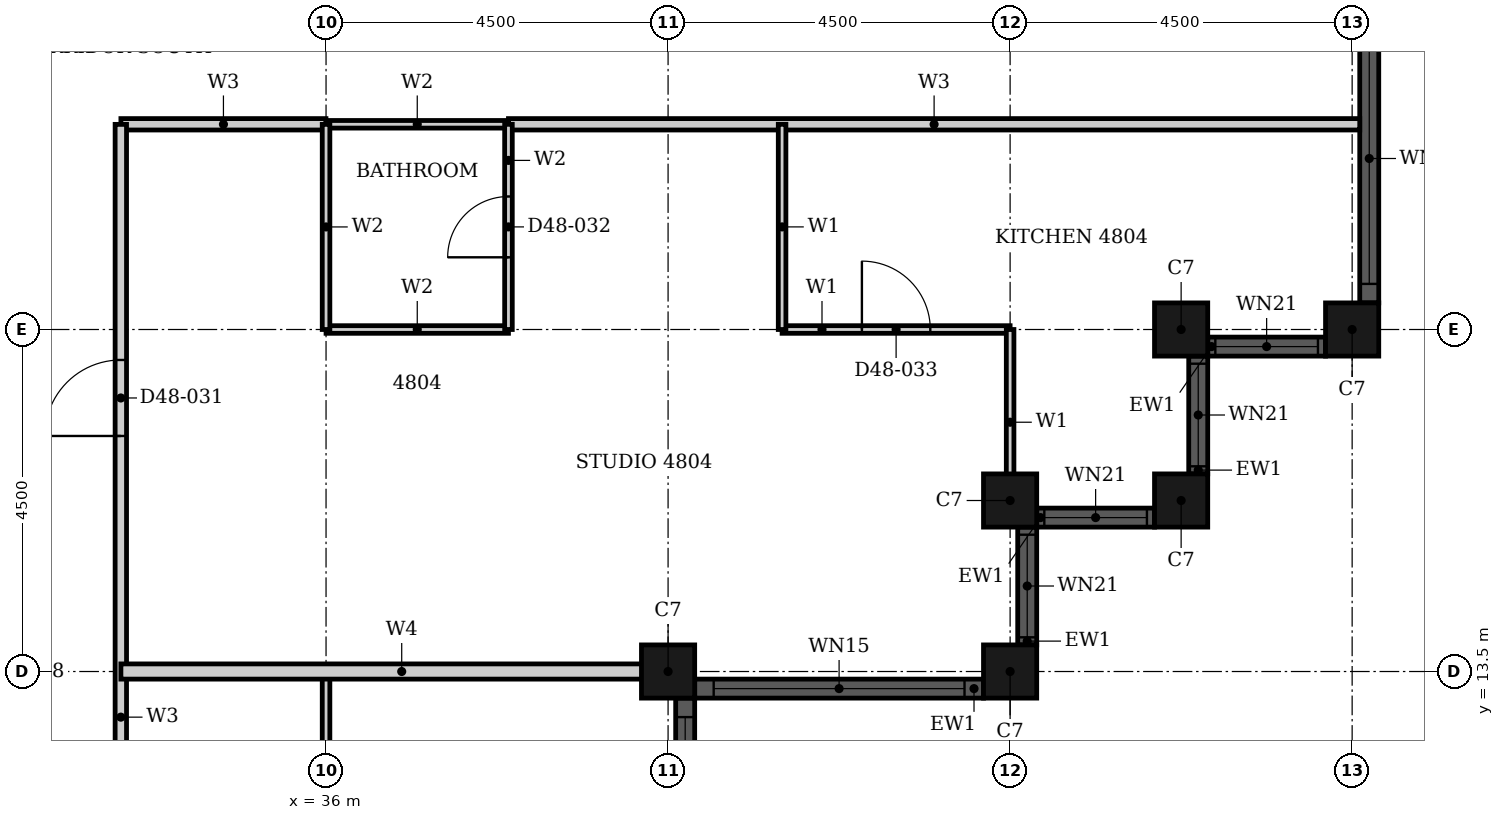
"""IFC4 building model, lengths in metres.
Left out: names, types, materials, properties, quantities, classifications, styles, units other than length and angle.
Written with IfcOpenShell. Run it as: python <this file> out.ifc"""

import sys

from ifc_helpers import new_model, si_unit, direction, frame, frame_2d, origin, origin_2d, place, context, subcontext, project, spatial, rectangle, hollow_rectangle, extrude, element, fill, save


model = new_model("IFC4")
c1 = context("Model", 3, precision=1e-05, world=origin(), true_north=direction((0.0, 1.0)))
c2 = subcontext(c1, "Body", "Model", "MODEL_VIEW")
j1 = project(units=[si_unit("LENGTHUNIT", "METRE"), si_unit("PLANEANGLEUNIT", "RADIAN")], contexts=[c1])
p1 = place(None, origin())
s1 = spatial("IfcSite", under=j1, at=p1, CompositionType="ELEMENT")
p2 = place(p1, origin())
s2 = spatial("IfcBuilding", under=s1, at=p2, CompositionType="ELEMENT")
p3 = place(p2, frame((0.0, 0.0, 192.4)))
s3 = spatial("IfcBuildingStorey", under=s2, at=p3, CompositionType="ELEMENT", Elevation=192.4)
for number, where, z_axis, x_axis in (
    (1, (40.5, 13.5, 0.0), (0.0, 0.0, 1.0), (1.0, 0.0, 0.0)),
    (2, (45.0, 13.5, 0.0), (0.0, 0.0, 1.0), (1.0, 0.0, 0.0)),
    (3, (45.0, 15.75, 0.0), (0.0, 0.0, 1.0), (1.0, 0.0, 0.0)),
    (4, (47.25, 15.75, 0.0), (0.0, 0.0, 1.0), (1.0, 0.0, 0.0)),
    (5, (47.25, 18.0, 0.0), (0.0, 0.0, 1.0), (1.0, 0.0, 0.0)),
    (6, (49.5, 18.0, 0.0), (0.0, 0.0, 1.0), (1.0, 0.0, 0.0)),
):
    element("IfcColumn", number, at=place(p3, frame(where, z_axis=z_axis, x_axis=x_axis)), inside=s3, PredefinedType="COLUMN", context=c2, shape_type="SweptSolid", body=[
        extrude(hollow_rectangle(XDim=0.7, YDim=0.7, WallThickness=0.022, at=origin_2d()), origin(), (0.0, 0.0, 1.0), 3.7),
    ])
p4 = place(p3, frame((40.85, 13.275, 0.0), z_axis=(0.0, 0.0, 1.0), x_axis=(1.0, 0.0, 0.0)))
e7 = element("IfcWall", 7, at=p4, inside=s3, PredefinedType="SOLIDWALL", context=c2, shape_type="SweptSolid", body=[
    extrude(rectangle(XDim=3.8, YDim=0.25, at=frame_2d((1.9, 0.0))), origin(), (0.0, 0.0, 1.0), 3.7),
])
p5 = place(p4, frame((0.25, 0.0, 0.45)))
e8 = element("IfcOpeningElement", 8, at=p5, cuts=e7, PredefinedType="OPENING", context=c2, shape_type="SweptSolid", body=[
    extrude(rectangle(XDim=3.3, YDim=2.3, at=frame_2d((1.65, 1.15))), frame((0.0, 0.135, 0.0), z_axis=(0.0, -1.0, 0.0), x_axis=(1.0, 0.0, 0.0)), (0.0, 0.0, 1.0), 0.27),
])
p6 = place(p3, frame((45.225, 13.85, 0.0), z_axis=(0.0, 0.0, 1.0), x_axis=(0.0, 1.0, 0.0)))
e9 = element("IfcWall", 9, at=p6, inside=s3, PredefinedType="SOLIDWALL", context=c2, shape_type="SweptSolid", body=[
    extrude(rectangle(XDim=1.55, YDim=0.25, at=frame_2d((0.775, 0.0))), origin(), (0.0, 0.0, 1.0), 3.7),
])
p7 = place(p6, frame((0.1, 0.0, 0.9)))
e10 = element("IfcOpeningElement", 10, at=p7, cuts=e9, PredefinedType="OPENING", context=c2, shape_type="SweptSolid", body=[
    extrude(rectangle(XDim=1.35, YDim=1.85, at=frame_2d((0.675, 0.925))), frame((0.0, 0.135, 0.0), z_axis=(0.0, -1.0, 0.0), x_axis=(1.0, 0.0, 0.0)), (0.0, 0.0, 1.0), 0.27),
])
p8 = place(p3, frame((45.35, 15.525, 0.0), z_axis=(0.0, 0.0, 1.0), x_axis=(1.0, 0.0, 0.0)))
e11 = element("IfcWall", 11, at=p8, inside=s3, PredefinedType="SOLIDWALL", context=c2, shape_type="SweptSolid", body=[
    extrude(rectangle(XDim=1.55, YDim=0.25, at=frame_2d((0.775, 0.0))), origin(), (0.0, 0.0, 1.0), 3.7),
])
p9 = place(p8, frame((0.1, 0.0, 0.9)))
e12 = element("IfcOpeningElement", 12, at=p9, cuts=e11, PredefinedType="OPENING", context=c2, shape_type="SweptSolid", body=[
    extrude(rectangle(XDim=1.35, YDim=1.85, at=frame_2d((0.675, 0.925))), frame((0.0, 0.135, 0.0), z_axis=(0.0, -1.0, 0.0), x_axis=(1.0, 0.0, 0.0)), (0.0, 0.0, 1.0), 0.27),
])
p10 = place(p3, frame((47.475, 16.1, 0.0), z_axis=(0.0, 0.0, 1.0), x_axis=(0.0, 1.0, 0.0)))
e13 = element("IfcWall", 13, at=p10, inside=s3, PredefinedType="SOLIDWALL", context=c2, shape_type="SweptSolid", body=[
    extrude(rectangle(XDim=1.55, YDim=0.25, at=frame_2d((0.775, 0.0))), origin(), (0.0, 0.0, 1.0), 3.7),
])
p11 = place(p10, frame((0.1, 0.0, 0.9)))
e14 = element("IfcOpeningElement", 14, at=p11, cuts=e13, PredefinedType="OPENING", context=c2, shape_type="SweptSolid", body=[
    extrude(rectangle(XDim=1.35, YDim=1.85, at=frame_2d((0.675, 0.925))), frame((0.0, 0.135, 0.0), z_axis=(0.0, -1.0, 0.0), x_axis=(1.0, 0.0, 0.0)), (0.0, 0.0, 1.0), 0.27),
])
p12 = place(p3, frame((47.6, 17.775, 0.0), z_axis=(0.0, 0.0, 1.0), x_axis=(1.0, 0.0, 0.0)))
e15 = element("IfcWall", 15, at=p12, inside=s3, PredefinedType="SOLIDWALL", context=c2, shape_type="SweptSolid", body=[
    extrude(rectangle(XDim=1.55, YDim=0.25, at=frame_2d((0.775, 0.0))), origin(), (0.0, 0.0, 1.0), 3.7),
])
p13 = place(p12, frame((0.1, 0.0, 0.9)))
e16 = element("IfcOpeningElement", 16, at=p13, cuts=e15, PredefinedType="OPENING", context=c2, shape_type="SweptSolid", body=[
    extrude(rectangle(XDim=1.35, YDim=1.85, at=frame_2d((0.675, 0.925))), frame((0.0, 0.135, 0.0), z_axis=(0.0, -1.0, 0.0), x_axis=(1.0, 0.0, 0.0)), (0.0, 0.0, 1.0), 0.27),
])
p14 = place(p3, frame((49.725, 18.35, 0.0), z_axis=(0.0, 0.0, 1.0), x_axis=(0.0, 1.0, 0.0)))
e17 = element("IfcWall", 17, at=p14, inside=s3, PredefinedType="SOLIDWALL", context=c2, shape_type="SweptSolid", body=[
    extrude(rectangle(XDim=8.3, YDim=0.25, at=frame_2d((4.15, 0.0))), origin(), (0.0, 0.0, 1.0), 3.7),
])
p15 = place(p14, frame((0.25, 0.0, 0.45)))
e18 = element("IfcOpeningElement", 18, at=p15, cuts=e17, PredefinedType="OPENING", context=c2, shape_type="SweptSolid", body=[
    extrude(rectangle(XDim=3.3, YDim=2.3, at=frame_2d((1.65, 1.15))), frame((0.0, 0.135, 0.0), z_axis=(0.0, -1.0, 0.0), x_axis=(1.0, 0.0, 0.0)), (0.0, 0.0, 1.0), 0.27),
])
p16 = place(p14, frame((4.75, 0.0, 0.45)))
e19 = element("IfcOpeningElement", 19, at=p16, cuts=e17, PredefinedType="OPENING", context=c2, shape_type="SweptSolid", body=[
    extrude(rectangle(XDim=3.3, YDim=2.3, at=frame_2d((1.65, 1.15))), frame((0.0, 0.135, 0.0), z_axis=(0.0, -1.0, 0.0), x_axis=(1.0, 0.0, 0.0)), (0.0, 0.0, 1.0), 0.27),
])
p17 = place(p3, frame((40.725, 4.85, 0.0), z_axis=(0.0, 0.0, 1.0), x_axis=(0.0, 1.0, 0.0)))
e20 = element("IfcWall", 20, at=p17, inside=s3, PredefinedType="SOLIDWALL", context=c2, shape_type="SweptSolid", body=[
    extrude(rectangle(XDim=8.3, YDim=0.25, at=frame_2d((4.15, 0.0))), origin(), (0.0, 0.0, 1.0), 3.7),
])
p18 = place(p17, frame((0.25, 0.0, 0.45)))
e21 = element("IfcOpeningElement", 21, at=p18, cuts=e20, PredefinedType="OPENING", context=c2, shape_type="SweptSolid", body=[
    extrude(rectangle(XDim=3.3, YDim=2.3, at=frame_2d((1.65, 1.15))), frame((0.0, 0.135, 0.0), z_axis=(0.0, -1.0, 0.0), x_axis=(1.0, 0.0, 0.0)), (0.0, 0.0, 1.0), 0.27),
])
p19 = place(p17, frame((4.75, 0.0, 0.45)))
e22 = element("IfcOpeningElement", 22, at=p19, cuts=e20, PredefinedType="OPENING", context=c2, shape_type="SweptSolid", body=[
    extrude(rectangle(XDim=3.3, YDim=2.3, at=frame_2d((1.65, 1.15))), frame((0.0, 0.135, 0.0), z_axis=(0.0, -1.0, 0.0), x_axis=(1.0, 0.0, 0.0)), (0.0, 0.0, 1.0), 0.27),
])
p20 = place(p3, frame((33.301, 20.7, 0.0), z_axis=(0.0, 0.0, 1.0), x_axis=(1.0, 0.0, 0.0)))
e23 = element("IfcWall", 23, at=p20, inside=s3, PredefinedType="PARTITIONING", context=c2, shape_type="SweptSolid", body=[
    extrude(rectangle(XDim=2.698, YDim=0.15, at=frame_2d((1.349, 0.0))), origin(), (0.0, 0.0, 1.0), 3.4),
])
p21 = place(p3, frame((38.4, 20.7, 0.0), z_axis=(0.0, 0.0, 1.0), x_axis=(1.0, 0.0, 0.0)))
e24 = element("IfcWall", 24, at=p21, inside=s3, PredefinedType="PARTITIONING", context=c2, shape_type="SweptSolid", body=[
    extrude(rectangle(XDim=11.2, YDim=0.15, at=frame_2d((5.6, 0.0))), origin(), (0.0, 0.0, 1.0), 3.4),
])
p22 = place(p3, frame((33.3, 6.9, 0.0), z_axis=(0.0, 0.0, 1.0), x_axis=(0.0, 1.0, 0.0)))
e25 = element("IfcWall", 25, at=p22, inside=s3, PredefinedType="PARTITIONING", context=c2, shape_type="SweptSolid", body=[
    extrude(rectangle(XDim=13.799, YDim=0.15, at=frame_2d((6.899, 0.0))), origin(), (0.0, 0.0, 1.0), 3.4),
])
p23 = place(p22, frame((9.699, 0.0, 0.0)))
e26 = element("IfcOpeningElement", 26, at=p23, cuts=e25, PredefinedType="OPENING", context=c2, shape_type="SweptSolid", body=[
    extrude(rectangle(XDim=1.0, YDim=2.2, at=frame_2d((0.5, 1.1))), frame((0.0, 0.085, 0.0), z_axis=(0.0, -1.0, 0.0), x_axis=(1.0, 0.0, 0.0)), (0.0, 0.0, 1.0), 0.17),
])
p24 = place(p22, frame((1.3, 0.0, 0.0)))
e27 = element("IfcOpeningElement", 27, at=p24, cuts=e25, PredefinedType="OPENING", context=c2, shape_type="SweptSolid", body=[
    extrude(rectangle(XDim=1.0, YDim=2.2, at=frame_2d((0.5, 1.1))), frame((0.0, 0.085, 0.0), z_axis=(0.0, -1.0, 0.0), x_axis=(1.0, 0.0, 0.0)), (0.0, 0.0, 1.0), 0.17),
])
p25 = place(p3, frame((42.0, 18.0, 0.0), z_axis=(0.0, 0.0, 1.0), x_axis=(1.0, 0.0, 0.0)))
e28 = element("IfcWall", 28, at=p25, inside=s3, PredefinedType="PARTITIONING", context=c2, shape_type="SweptSolid", body=[
    extrude(rectangle(XDim=3.0, YDim=0.1, at=frame_2d((1.5, 0.0))), origin(), (0.0, 0.0, 1.0), 3.4),
])
p26 = place(p25, frame((1.05, 0.0, 0.0)))
e29 = element("IfcOpeningElement", 29, at=p26, cuts=e28, PredefinedType="OPENING", context=c2, shape_type="SweptSolid", body=[
    extrude(rectangle(XDim=0.9, YDim=2.1, at=frame_2d((0.45, 1.05))), frame((0.0, 0.06, 0.0), z_axis=(0.0, -1.0, 0.0), x_axis=(1.0, 0.0, 0.0)), (0.0, 0.0, 1.0), 0.12),
])
p27 = place(p3, frame((36.0, 10.5, 0.0), z_axis=(0.0, 0.0, 1.0), x_axis=(0.0, 1.0, 0.0)))
e30 = element("IfcWall", 30, at=p27, inside=s3, PredefinedType="PARTITIONING", context=c2, shape_type="SweptSolid", body=[
    extrude(rectangle(XDim=3.0, YDim=0.1, at=frame_2d((1.5, 0.0))), origin(), (0.0, 0.0, 1.0), 2.68),
])
p28 = place(p27, frame((1.05, 0.0, 0.0)))
e31 = element("IfcOpeningElement", 31, at=p28, cuts=e30, PredefinedType="OPENING", context=c2, shape_type="SweptSolid", body=[
    extrude(rectangle(XDim=0.9, YDim=2.1, at=frame_2d((0.45, 1.05))), frame((0.0, 0.06, 0.0), z_axis=(0.0, -1.0, 0.0), x_axis=(1.0, 0.0, 0.0)), (0.0, 0.0, 1.0), 0.12),
])
p29 = place(p3, frame((42.0, 18.0, 0.0), z_axis=(0.0, 0.0, 1.0), x_axis=(0.0, 1.0, 0.0)))
e32 = element("IfcWall", 32, at=p29, inside=s3, PredefinedType="PARTITIONING", context=c2, shape_type="SweptSolid", body=[
    extrude(rectangle(XDim=2.7, YDim=0.1, at=frame_2d((1.35, 0.0))), origin(), (0.0, 0.0, 1.0), 3.4),
])
p30 = place(p3, frame((45.0, 15.56, 0.0), z_axis=(0.0, 0.0, 1.0), x_axis=(0.0, 1.0, 0.0)))
e33 = element("IfcWall", 33, at=p30, inside=s3, PredefinedType="PARTITIONING", context=c2, shape_type="SweptSolid", body=[
    extrude(rectangle(XDim=2.44, YDim=0.1, at=frame_2d((1.22, 0.0))), origin(), (0.0, 0.0, 1.0), 3.4),
])
p31 = place(p3, frame((33.301, 13.5, 0.0), z_axis=(0.0, 0.0, 1.0), x_axis=(1.0, 0.0, 0.0)))
e34 = element("IfcWall", 34, at=p31, inside=s3, PredefinedType="PARTITIONING", context=c2, shape_type="SweptSolid", body=[
    extrude(rectangle(XDim=7.389, YDim=0.2, at=frame_2d((3.694, 0.0))), origin(), (0.0, 0.0, 1.0), 2.48),
])
for number, where, z_axis, x_axis in (
    (35, (36.0, 18.0, 0.0), (0.0, 0.0, 1.0), (1.0, 0.0, 0.0)),
    (36, (36.0, 20.7, 0.0), (0.0, 0.0, 1.0), (1.0, 0.0, 0.0)),
):
    element("IfcWall", number, at=place(p3, frame(where, z_axis=z_axis, x_axis=x_axis)), inside=s3, PredefinedType="PARTITIONING", context=c2, shape_type="SweptSolid", body=[
        extrude(rectangle(XDim=2.4, YDim=0.1, at=frame_2d((1.2, 0.0))), origin(), (0.0, 0.0, 1.0), 3.4),
    ])
p32 = place(p3, frame((36.0, 18.0, 0.0), z_axis=(0.0, 0.0, 1.0), x_axis=(0.0, 1.0, 0.0)))
e37 = element("IfcWall", 37, at=p32, inside=s3, PredefinedType="PARTITIONING", context=c2, shape_type="SweptSolid", body=[
    extrude(rectangle(XDim=2.699, YDim=0.1, at=frame_2d((1.35, 0.0))), origin(), (0.0, 0.0, 1.0), 3.4),
])
p33 = place(p3, frame((38.4, 18.0, 0.0), z_axis=(0.0, 0.0, 1.0), x_axis=(0.0, 1.0, 0.0)))
e38 = element("IfcWall", 38, at=p33, inside=s3, PredefinedType="PARTITIONING", context=c2, shape_type="SweptSolid", body=[
    extrude(rectangle(XDim=2.7, YDim=0.1, at=frame_2d((1.35, 0.0))), origin(), (0.0, 0.0, 1.0), 3.4),
])
p34 = place(p33, frame((0.95, 0.0, 0.0)))
e39 = element("IfcOpeningElement", 39, at=p34, cuts=e38, PredefinedType="OPENING", context=c2, shape_type="SweptSolid", body=[
    extrude(rectangle(XDim=0.8, YDim=2.1, at=frame_2d((0.4, 1.05))), frame((0.0, 0.06, 0.0), z_axis=(0.0, -1.0, 0.0), x_axis=(1.0, 0.0, 0.0)), (0.0, 0.0, 1.0), 0.12),
])
p35 = place(p5, origin())
e40 = element("IfcWindow", 40, at=p35, inside=s3, PartitioningType="SINGLE_PANEL", PredefinedType="WINDOW", context=c2, shape_type="SweptSolid", body=[
    extrude(rectangle(XDim=3.3, YDim=2.3, at=frame_2d((1.65, 1.15))), frame((0.0, 0.03, 0.0), z_axis=(0.0, -1.0, 0.0), x_axis=(1.0, 0.0, 0.0)), (0.0, 0.0, 1.0), 0.06),
])
fill(e8, e40)
p36 = place(p7, origin())
e41 = element("IfcWindow", 41, at=p36, inside=s3, PartitioningType="SINGLE_PANEL", PredefinedType="WINDOW", context=c2, shape_type="SweptSolid", body=[
    extrude(rectangle(XDim=1.35, YDim=1.85, at=frame_2d((0.675, 0.925))), frame((0.0, 0.03, 0.0), z_axis=(0.0, -1.0, 0.0), x_axis=(1.0, 0.0, 0.0)), (0.0, 0.0, 1.0), 0.06),
])
fill(e10, e41)
p37 = place(p9, origin())
e42 = element("IfcWindow", 42, at=p37, inside=s3, PartitioningType="SINGLE_PANEL", PredefinedType="WINDOW", context=c2, shape_type="SweptSolid", body=[
    extrude(rectangle(XDim=1.35, YDim=1.85, at=frame_2d((0.675, 0.925))), frame((0.0, 0.03, 0.0), z_axis=(0.0, -1.0, 0.0), x_axis=(1.0, 0.0, 0.0)), (0.0, 0.0, 1.0), 0.06),
])
fill(e12, e42)
p38 = place(p11, origin())
e43 = element("IfcWindow", 43, at=p38, inside=s3, PartitioningType="SINGLE_PANEL", PredefinedType="WINDOW", context=c2, shape_type="SweptSolid", body=[
    extrude(rectangle(XDim=1.35, YDim=1.85, at=frame_2d((0.675, 0.925))), frame((0.0, 0.03, 0.0), z_axis=(0.0, -1.0, 0.0), x_axis=(1.0, 0.0, 0.0)), (0.0, 0.0, 1.0), 0.06),
])
fill(e14, e43)
p39 = place(p13, origin())
e44 = element("IfcWindow", 44, at=p39, inside=s3, PartitioningType="SINGLE_PANEL", PredefinedType="WINDOW", context=c2, shape_type="SweptSolid", body=[
    extrude(rectangle(XDim=1.35, YDim=1.85, at=frame_2d((0.675, 0.925))), frame((0.0, 0.03, 0.0), z_axis=(0.0, -1.0, 0.0), x_axis=(1.0, 0.0, 0.0)), (0.0, 0.0, 1.0), 0.06),
])
fill(e16, e44)
p40 = place(p15, origin())
e45 = element("IfcWindow", 45, at=p40, inside=s3, PartitioningType="SINGLE_PANEL", PredefinedType="WINDOW", context=c2, shape_type="SweptSolid", body=[
    extrude(rectangle(XDim=3.3, YDim=2.3, at=frame_2d((1.65, 1.15))), frame((0.0, 0.03, 0.0), z_axis=(0.0, -1.0, 0.0), x_axis=(1.0, 0.0, 0.0)), (0.0, 0.0, 1.0), 0.06),
])
fill(e18, e45)
p41 = place(p19, origin())
e46 = element("IfcWindow", 46, at=p41, inside=s3, PartitioningType="SINGLE_PANEL", PredefinedType="WINDOW", context=c2, shape_type="SweptSolid", body=[
    extrude(rectangle(XDim=3.3, YDim=2.3, at=frame_2d((1.65, 1.15))), frame((0.0, 0.03, 0.0), z_axis=(0.0, -1.0, 0.0), x_axis=(1.0, 0.0, 0.0)), (0.0, 0.0, 1.0), 0.06),
])
fill(e22, e46)
p42 = place(p23, origin())
e47 = element("IfcDoor", 47, at=p42, inside=s3, OperationType="SINGLE_SWING_RIGHT", PredefinedType="DOOR", context=c2, shape_type="SweptSolid", body=[
    extrude(rectangle(XDim=1.0, YDim=2.2, at=frame_2d((0.5, 1.1))), frame((0.0, 0.025, 0.0), z_axis=(0.0, -1.0, 0.0), x_axis=(1.0, 0.0, 0.0)), (0.0, 0.0, 1.0), 0.05),
])
fill(e26, e47)
p43 = place(p34, origin())
e48 = element("IfcDoor", 48, at=p43, inside=s3, OperationType="SINGLE_SWING_RIGHT", PredefinedType="DOOR", context=c2, shape_type="SweptSolid", body=[
    extrude(rectangle(XDim=0.8, YDim=2.1, at=frame_2d((0.4, 1.05))), frame((0.0, 0.025, 0.0), z_axis=(0.0, -1.0, 0.0), x_axis=(1.0, 0.0, 0.0)), (0.0, 0.0, 1.0), 0.05),
])
fill(e39, e48)
p44 = place(p26, origin())
e49 = element("IfcDoor", 49, at=p44, inside=s3, OperationType="SINGLE_SWING_LEFT", PredefinedType="DOOR", context=c2, shape_type="SweptSolid", body=[
    extrude(rectangle(XDim=0.9, YDim=2.1, at=frame_2d((0.45, 1.05))), frame((0.0, 0.025, 0.0), z_axis=(0.0, -1.0, 0.0), x_axis=(1.0, 0.0, 0.0)), (0.0, 0.0, 1.0), 0.05),
])
fill(e29, e49)
save(model, sys.argv[1])
